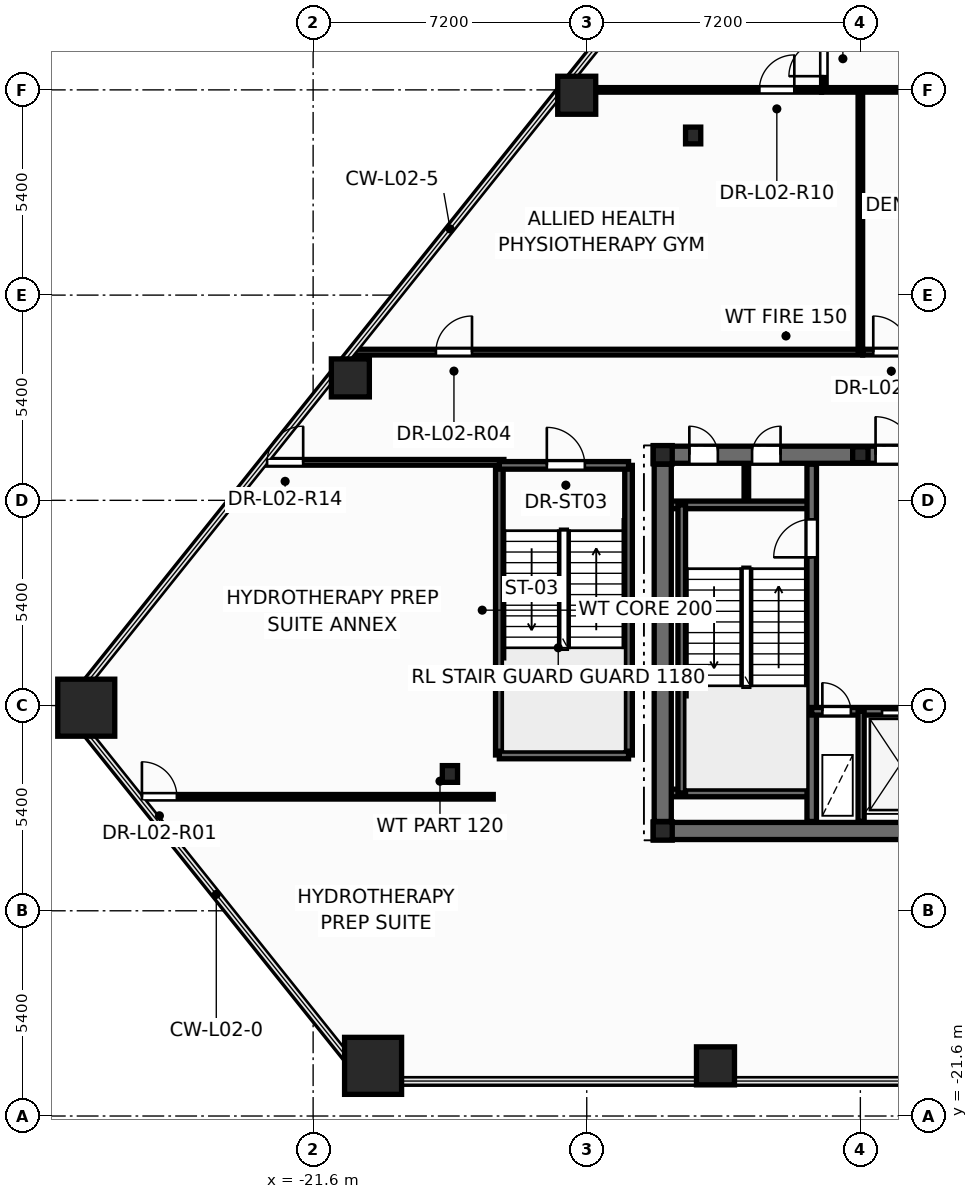
"""IFC4 building model, lengths in metres.
Left out: names, types, materials, properties, quantities, classifications, styles, units other than length and angle.
Written with IfcOpenShell. Run it as: python <this file> out.ifc"""

import sys

from ifc_helpers import new_model, si_unit, direction, frame, frame_2d, origin, origin_2d, place, context, subcontext, project, spatial, rectangle, hollow_rectangle, hollow_circle, i_section, extrude, element, fill, save


model = new_model("IFC4")
c1 = context("Model", 3, precision=1e-05, world=origin(), true_north=direction((0.0, 1.0)))
c2 = subcontext(c1, "Body", "Model", "MODEL_VIEW")
j1 = project(units=[si_unit("LENGTHUNIT", "METRE"), si_unit("PLANEANGLEUNIT", "RADIAN")], contexts=[c1])
p1 = place(None, origin())
s1 = spatial("IfcSite", under=j1, at=p1, CompositionType="ELEMENT")
p2 = place(p1, origin())
s2 = spatial("IfcBuilding", under=s1, at=p2, CompositionType="ELEMENT")
p3 = place(p2, frame((0.0, 0.0, 9.9)))
s3 = spatial("IfcBuildingStorey", under=s2, at=p3, CompositionType="ELEMENT", Elevation=9.9)
for number, where, z_axis, x_axis in (
    (1, (-27.57, -10.856, 0.0), (0.0, 0.0, 1.0), (1.0, 0.0, 0.0)),
    (2, (-20.022, -20.28, 0.0), (0.0, 0.0, 1.0), (1.0, 0.0, 0.0)),
):
    element("IfcColumn", number, at=place(p3, frame(where, z_axis=z_axis, x_axis=x_axis)), inside=s3, PredefinedType="COLUMN", context=c2, shape_type="SweptSolid", body=[
        extrude(hollow_rectangle(XDim=1.5, YDim=1.5, WallThickness=0.075, at=origin_2d()), origin(), (0.0, 0.0, 1.0), 4.5),
    ])
for number, where, z_axis, x_axis in (
    (3, (-11.012, -20.28, 0.0), (0.0, 0.0, 1.0), (1.0, 0.0, 0.0)),
    (4, (-14.664, 5.259, 0.0), (0.0, 0.0, 1.0), (1.0, 0.0, 0.0)),
    (5, (-20.62, -2.179, 0.0), (0.0, 0.0, 1.0), (1.0, 0.0, 0.0)),
):
    element("IfcColumn", number, at=place(p3, frame(where, z_axis=z_axis, x_axis=x_axis)), inside=s3, PredefinedType="COLUMN", context=c2, shape_type="SweptSolid", body=[
        extrude(hollow_circle(Radius=0.5, WallThickness=0.045, at=origin_2d()), origin(), (0.0, 0.0, 1.0), 4.5),
    ])
for number, where, z_axis, x_axis in (
    (6, (-12.4, -14.1, 0.0), (0.0, 0.0, 1.0), (1.0, 0.0, 0.0)),
    (7, (-12.4, -4.2, 0.0), (0.0, 0.0, 1.0), (1.0, 0.0, 0.0)),
):
    element("IfcColumn", number, at=place(p3, frame(where, z_axis=z_axis, x_axis=x_axis)), inside=s3, PredefinedType="COLUMN", context=c2, shape_type="SweptSolid", body=[
        extrude(i_section(OverallWidth=0.5, OverallDepth=0.482, WebThickness=0.04, FlangeThickness=0.045, at=origin_2d()), origin(), (0.0, 0.0, 1.0), 4.5),
    ])
p4 = place(p3, frame((-7.2, -4.2, 0.0), z_axis=(0.0, 0.0, 1.0), x_axis=(1.0, 0.0, 0.0)))
e8 = element("IfcColumn", 8, at=p4, inside=s3, PredefinedType="PILASTER", context=c2, shape_type="SweptSolid", body=[
    extrude(i_section(OverallWidth=0.405, OverallDepth=0.414, WebThickness=0.022, FlangeThickness=0.032, at=origin_2d()), origin(), (0.0, 0.0, 1.0), 4.5),
])
for number, where, z_axis, x_axis in (
    (9, (-18.0, -12.6, 0.0), (0.0, 0.0, 1.0), (1.0, 0.0, 0.0)),
    (10, (-11.6, 4.2, 0.0), (0.0, 0.0, 1.0), (1.0, 0.0, 0.0)),
):
    element("IfcColumn", number, at=place(p3, frame(where, z_axis=z_axis, x_axis=x_axis)), inside=s3, PredefinedType="COLUMN", context=c2, shape_type="SweptSolid", body=[
        extrude(i_section(OverallWidth=0.4, OverallDepth=0.44, WebThickness=0.028, FlangeThickness=0.04, at=origin_2d()), origin(), (0.0, 0.0, 1.0), 4.5),
    ])
p5 = place(p3, frame((-10.2, -5.52, 0.0), z_axis=(0.0, 0.0, 1.0), x_axis=(0.0, 1.0, 0.0)))
e11 = element("IfcWall", 11, at=p5, inside=s3, PredefinedType="PARTITIONING", context=c2, shape_type="SweptSolid", body=[
    extrude(rectangle(XDim=1.12, YDim=0.12, at=frame_2d((0.56, 0.0))), origin(), (0.0, 0.0, 1.0), 4.22),
])
p6 = place(p3, frame((-12.65, -14.1, 0.0), z_axis=(0.0, 0.0, 1.0), x_axis=(1.0, 0.0, 0.0)))
e12 = element("IfcWall", 12, at=p6, inside=s3, PredefinedType="SHEAR", context=c2, shape_type="SweptSolid", body=[
    extrude(rectangle(XDim=25.3, YDim=0.45, at=frame_2d((12.65, 0.0))), origin(), (0.0, 0.0, 1.0), 4.5),
])
p7 = place(p3, frame((-12.65, -4.2, 0.0), z_axis=(0.0, 0.0, 1.0), x_axis=(1.0, 0.0, 0.0)))
e13 = element("IfcWall", 13, at=p7, inside=s3, PredefinedType="SHEAR", context=c2, shape_type="SweptSolid", body=[
    extrude(rectangle(XDim=25.3, YDim=0.45, at=frame_2d((12.65, 0.0))), origin(), (0.0, 0.0, 1.0), 4.5),
])
p8 = place(p7, frame((0.95, 0.0, 0.0)))
e14 = element("IfcOpeningElement", 14, at=p8, cuts=e13, PredefinedType="OPENING", context=c2, shape_type="SweptSolid", body=[
    extrude(rectangle(XDim=0.756, YDim=2.054, at=frame_2d((0.375, 1.027))), frame((0.0, 0.235, 0.0), z_axis=(0.0, -1.0, 0.0), x_axis=(1.0, 0.0, 0.0)), (0.0, 0.0, 1.0), 0.47),
])
p9 = place(p7, frame((2.6, 0.0, 0.0)))
e15 = element("IfcOpeningElement", 15, at=p9, cuts=e13, PredefinedType="OPENING", context=c2, shape_type="SweptSolid", body=[
    extrude(rectangle(XDim=0.756, YDim=2.054, at=frame_2d((0.375, 1.027))), frame((0.0, 0.235, 0.0), z_axis=(0.0, -1.0, 0.0), x_axis=(1.0, 0.0, 0.0)), (0.0, 0.0, 1.0), 0.47),
])
p10 = place(p7, frame((21.85, 0.0, 0.0)))
e16 = element("IfcOpeningElement", 16, at=p10, cuts=e13, PredefinedType="OPENING", context=c2, shape_type="SweptSolid", body=[
    extrude(rectangle(XDim=0.756, YDim=2.054, at=frame_2d((0.375, 1.027))), frame((0.0, 0.235, 0.0), z_axis=(0.0, -1.0, 0.0), x_axis=(1.0, 0.0, 0.0)), (0.0, 0.0, 1.0), 0.47),
])
p11 = place(p7, frame((23.5, 0.0, 0.0)))
e17 = element("IfcOpeningElement", 17, at=p11, cuts=e13, PredefinedType="OPENING", context=c2, shape_type="SweptSolid", body=[
    extrude(rectangle(XDim=0.756, YDim=2.054, at=frame_2d((0.375, 1.027))), frame((0.0, 0.235, 0.0), z_axis=(0.0, -1.0, 0.0), x_axis=(1.0, 0.0, 0.0)), (0.0, 0.0, 1.0), 0.47),
])
p12 = place(p7, frame((5.85, 0.0, 0.0)))
e18 = element("IfcOpeningElement", 18, at=p12, cuts=e13, PredefinedType="OPENING", context=c2, shape_type="SweptSolid", body=[
    extrude(rectangle(XDim=1.006, YDim=2.104, at=frame_2d((0.5, 1.052))), frame((0.0, 0.235, 0.0), z_axis=(0.0, -1.0, 0.0), x_axis=(1.0, 0.0, 0.0)), (0.0, 0.0, 1.0), 0.47),
])
p13 = place(p7, frame((10.35, 0.0, 0.0)))
e19 = element("IfcOpeningElement", 19, at=p13, cuts=e13, PredefinedType="OPENING", context=c2, shape_type="SweptSolid", body=[
    extrude(rectangle(XDim=1.406, YDim=2.154, at=frame_2d((0.7, 1.077))), frame((0.0, 0.235, 0.0), z_axis=(0.0, -1.0, 0.0), x_axis=(1.0, 0.0, 0.0)), (0.0, 0.0, 1.0), 0.47),
])
p14 = place(p7, frame((18.45, 0.0, 0.0)))
e20 = element("IfcOpeningElement", 20, at=p14, cuts=e13, PredefinedType="OPENING", context=c2, shape_type="SweptSolid", body=[
    extrude(rectangle(XDim=1.006, YDim=2.104, at=frame_2d((0.5, 1.052))), frame((0.0, 0.235, 0.0), z_axis=(0.0, -1.0, 0.0), x_axis=(1.0, 0.0, 0.0)), (0.0, 0.0, 1.0), 0.47),
])
for number, where, z_axis, x_axis in (
    (21, (-12.35, -5.52, 0.0), (0.0, 0.0, 1.0), (1.0, 0.0, 0.0)),
    (22, (-12.35, -13.1, 0.0), (0.0, 0.0, 1.0), (1.0, 0.0, 0.0)),
):
    element("IfcWall", number, at=place(p3, frame(where, z_axis=z_axis, x_axis=x_axis)), inside=s3, PredefinedType="SOLIDWALL", context=c2, shape_type="SweptSolid", body=[
        extrude(rectangle(XDim=3.87, YDim=0.2, at=frame_2d((1.935, 0.0))), origin(), (0.0, 0.0, 1.0), 4.5),
    ])
p15 = place(p3, frame((-11.9, -13.1, 0.0), z_axis=(0.0, 0.0, 1.0), x_axis=(0.0, 1.0, 0.0)))
e23 = element("IfcWall", 23, at=p15, inside=s3, PredefinedType="SOLIDWALL", context=c2, shape_type="SweptSolid", body=[
    extrude(rectangle(XDim=7.58, YDim=0.2, at=frame_2d((3.79, 0.0))), origin(), (0.0, 0.0, 1.0), 4.5),
])
p16 = place(p3, frame((-8.48, -13.85, 0.0), z_axis=(0.0, 0.0, 1.0), x_axis=(0.0, 1.0, 0.0)))
e24 = element("IfcWall", 24, at=p16, inside=s3, PredefinedType="SHEAR", context=c2, shape_type="SweptSolid", body=[
    extrude(rectangle(XDim=9.4, YDim=0.25, at=frame_2d((4.7, 0.0))), origin(), (0.0, 0.0, 1.0), 4.5),
])
p17 = place(p16, frame((6.95, 0.0, 0.0)))
e25 = element("IfcOpeningElement", 25, at=p17, cuts=e24, PredefinedType="OPENING", context=c2, shape_type="SweptSolid", body=[
    extrude(rectangle(XDim=1.006, YDim=2.104, at=frame_2d((0.5, 1.052))), frame((0.0, 0.135, 0.0), z_axis=(0.0, -1.0, 0.0), x_axis=(1.0, 0.0, 0.0)), (0.0, 0.0, 1.0), 0.27),
])
p18 = place(p3, frame((-8.48, -10.95, 0.0), z_axis=(0.0, 0.0, 1.0), x_axis=(1.0, 0.0, 0.0)))
e26 = element("IfcWall", 26, at=p18, inside=s3, PredefinedType="SOLIDWALL", context=c2, shape_type="SweptSolid", body=[
    extrude(rectangle(XDim=3.36, YDim=0.2, at=frame_2d((1.68, 0.0))), origin(), (0.0, 0.0, 1.0), 4.5),
])
p19 = place(p18, frame((0.28, 0.0, 0.0)))
e27 = element("IfcOpeningElement", 27, at=p19, cuts=e26, PredefinedType="OPENING", context=c2, shape_type="SweptSolid", body=[
    extrude(rectangle(XDim=0.756, YDim=2.054, at=frame_2d((0.375, 1.027))), frame((0.0, 0.11, 0.0), z_axis=(0.0, -1.0, 0.0), x_axis=(1.0, 0.0, 0.0)), (0.0, 0.0, 1.0), 0.22),
])
p20 = place(p18, frame((1.85, 0.0, 0.0)))
e28 = element("IfcOpeningElement", 28, at=p20, cuts=e26, PredefinedType="OPENING", context=c2, shape_type="SweptSolid", body=[
    extrude(rectangle(XDim=1.106, YDim=2.104, at=frame_2d((0.55, 1.052))), frame((0.0, 0.11, 0.0), z_axis=(0.0, -1.0, 0.0), x_axis=(1.0, 0.0, 0.0)), (0.0, 0.0, 1.0), 0.22),
])
p21 = place(p3, frame((-7.18, -13.85, 0.0), z_axis=(0.0, 0.0, 1.0), x_axis=(0.0, 1.0, 0.0)))
e29 = element("IfcWall", 29, at=p21, inside=s3, PredefinedType="PARTITIONING", context=c2, shape_type="SweptSolid", body=[
    extrude(rectangle(XDim=2.9, YDim=0.16, at=frame_2d((1.45, 0.0))), origin(), (0.0, 0.0, 1.0), 3.245),
])
p22 = place(p3, frame((-12.4, -13.85, 0.0), z_axis=(0.0, 0.0, 1.0), x_axis=(0.0, 1.0, 0.0)))
e30 = element("IfcWall", 30, at=p22, inside=s3, PredefinedType="SHEAR", context=c2, shape_type="SweptSolid", body=[
    extrude(rectangle(XDim=9.4, YDim=0.45, at=frame_2d((4.7, 0.0))), origin(), (0.0, 0.0, 1.0), 4.5),
])
p23 = place(p3, frame((-20.589, -1.5, 0.0), z_axis=(0.0, 0.0, 1.0), x_axis=(1.0, 0.0, 0.0)))
e31 = element("IfcWall", 31, at=p23, inside=s3, PredefinedType="PARTITIONING", context=c2, shape_type="SweptSolid", body=[
    extrude(rectangle(XDim=13.449, YDim=0.15, at=frame_2d((6.725, 0.0))), origin(), (0.0, 0.0, 1.0), 3.287),
])
p24 = place(p23, frame((2.22, 0.0, 0.0)))
e32 = element("IfcOpeningElement", 32, at=p24, cuts=e31, PredefinedType="OPENING", context=c2, shape_type="SweptSolid", body=[
    extrude(rectangle(XDim=0.956, YDim=2.104, at=frame_2d((0.475, 1.052))), frame((0.0, 0.085, 0.0), z_axis=(0.0, -1.0, 0.0), x_axis=(1.0, 0.0, 0.0)), (0.0, 0.0, 1.0), 0.17),
])
p25 = place(p3, frame((-26.205, -13.2, 0.0), z_axis=(0.0, 0.0, 1.0), x_axis=(1.0, 0.0, 0.0)))
e33 = element("IfcWall", 33, at=p25, inside=s3, PredefinedType="PARTITIONING", context=c2, shape_type="SweptSolid", body=[
    extrude(rectangle(XDim=9.345, YDim=0.12, at=frame_2d((4.672, 0.0))), origin(), (0.0, 0.0, 1.0), 3.583),
])
p26 = place(p25, frame((0.1, 0.0, 0.0)))
e34 = element("IfcOpeningElement", 34, at=p26, cuts=e33, PredefinedType="OPENING", context=c2, shape_type="SweptSolid", body=[
    extrude(rectangle(XDim=0.926, YDim=2.104, at=frame_2d((0.46, 1.052))), frame((0.0, 0.07, 0.0), z_axis=(0.0, -1.0, 0.0), x_axis=(1.0, 0.0, 0.0)), (0.0, 0.0, 1.0), 0.14),
])
p27 = place(p3, frame((-8.16, 5.4, 0.0), z_axis=(0.0, 0.0, 1.0), x_axis=(0.0, 1.0, 0.0)))
e35 = element("IfcWall", 35, at=p27, inside=s3, PredefinedType="PARTITIONING", context=c2, shape_type="SweptSolid", body=[
    extrude(rectangle(XDim=8.619, YDim=0.12, at=frame_2d((4.31, 0.0))), origin(), (0.0, 0.0, 1.0), 3.195),
])
p28 = place(p27, frame((0.36, 0.0, 0.0)))
e36 = element("IfcOpeningElement", 36, at=p28, cuts=e35, PredefinedType="OPENING", context=c2, shape_type="SweptSolid", body=[
    extrude(rectangle(XDim=0.926, YDim=2.104, at=frame_2d((0.46, 1.052))), frame((0.0, 0.07, 0.0), z_axis=(0.0, -1.0, 0.0), x_axis=(1.0, 0.0, 0.0)), (0.0, 0.0, 1.0), 0.14),
])
p29 = place(p3, frame((-7.138, -1.5, 0.0), z_axis=(0.0, 0.0, 1.0), x_axis=(1.0, 0.0, 0.0)))
e37 = element("IfcWall", 37, at=p29, inside=s3, PredefinedType="PARTITIONING", context=c2, shape_type="SweptSolid", body=[
    extrude(rectangle(XDim=7.698, YDim=0.15, at=frame_2d((3.849, 0.0))), origin(), (0.0, 0.0, 1.0), 4.22),
])
p30 = place(p29, frame((0.278, 0.0, 0.0)))
e38 = element("IfcOpeningElement", 38, at=p30, cuts=e37, PredefinedType="OPENING", context=c2, shape_type="SweptSolid", body=[
    extrude(rectangle(XDim=0.956, YDim=2.104, at=frame_2d((0.475, 1.052))), frame((0.0, 0.085, 0.0), z_axis=(0.0, -1.0, 0.0), x_axis=(1.0, 0.0, 0.0)), (0.0, 0.0, 1.0), 0.17),
])
for number, where, z_axis, x_axis in (
    (39, (-16.7, -12.1, 0.0), (0.0, 0.0, 1.0), (0.0, 1.0, 0.0)),
    (40, (-13.3, -12.1, 0.0), (0.0, 0.0, 1.0), (0.0, 1.0, 0.0)),
):
    element("IfcWall", number, at=place(p3, frame(where, z_axis=z_axis, x_axis=x_axis)), inside=s3, PredefinedType="SOLIDWALL", context=c2, shape_type="SweptSolid", body=[
        extrude(rectangle(XDim=7.62, YDim=0.2, at=frame_2d((3.81, 0.0))), origin(), (0.0, 0.0, 1.0), 4.5),
    ])
p31 = place(p3, frame((-8.22, 5.4, 0.0), z_axis=(0.0, 0.0, 1.0), x_axis=(1.0, 0.0, 0.0)))
e41 = element("IfcWall", 41, at=p31, inside=s3, PredefinedType="PARTITIONING", context=c2, shape_type="SweptSolid", body=[
    extrude(rectangle(XDim=8.72, YDim=0.12, at=frame_2d((4.36, 0.0))), origin(), (0.0, 0.0, 1.0), 4.22),
])
p32 = place(p3, frame((-15.063, 5.4, 0.0), z_axis=(0.0, 0.0, 1.0), x_axis=(1.0, 0.0, 0.0)))
e42 = element("IfcWall", 42, at=p32, inside=s3, PredefinedType="PARTITIONING", context=c2, shape_type="SweptSolid", body=[
    extrude(rectangle(XDim=6.841, YDim=0.12, at=frame_2d((3.42, 0.0))), origin(), (0.0, 0.0, 1.0), 3.195),
])
p33 = place(p32, frame((5.205, 0.0, 0.0)))
e43 = element("IfcOpeningElement", 43, at=p33, cuts=e42, PredefinedType="OPENING", context=c2, shape_type="SweptSolid", body=[
    extrude(rectangle(XDim=0.926, YDim=2.104, at=frame_2d((0.46, 1.052))), frame((0.0, 0.07, 0.0), z_axis=(0.0, -1.0, 0.0), x_axis=(1.0, 0.0, 0.0)), (0.0, 0.0, 1.0), 0.14),
])
p34 = place(p3, frame((-7.2, -1.5, 0.0), z_axis=(0.0, 0.0, 1.0), x_axis=(0.0, 1.0, 0.0)))
e44 = element("IfcWall", 44, at=p34, inside=s3, PredefinedType="PARTITIONING", context=c2, shape_type="SweptSolid", body=[
    extrude(rectangle(XDim=6.9, YDim=0.12, at=frame_2d((3.45, 0.0))), origin(), (0.0, 0.0, 1.0), 2.995),
])
p35 = place(p3, frame((-22.912, -4.4, 0.0), z_axis=(0.0, 0.0, 1.0), x_axis=(1.0, 0.0, 0.0)))
e45 = element("IfcWall", 45, at=p35, inside=s3, PredefinedType="PARTITIONING", context=c2, shape_type="SweptSolid", body=[
    extrude(rectangle(XDim=6.332, YDim=0.15, at=frame_2d((3.166, 0.0))), origin(), (0.0, 0.0, 1.0), 3.583),
])
p36 = place(p35, frame((0.1, 0.0, 0.0)))
e46 = element("IfcOpeningElement", 46, at=p36, cuts=e45, PredefinedType="OPENING", context=c2, shape_type="SweptSolid", body=[
    extrude(rectangle(XDim=0.956, YDim=2.104, at=frame_2d((0.475, 1.052))), frame((0.0, 0.085, 0.0), z_axis=(0.0, -1.0, 0.0), x_axis=(1.0, 0.0, 0.0)), (0.0, 0.0, 1.0), 0.17),
])
p37 = place(p3, frame((-16.7, -12.1, 0.0), z_axis=(0.0, 0.0, 1.0), x_axis=(1.0, 0.0, 0.0)))
e47 = element("IfcWall", 47, at=p37, inside=s3, PredefinedType="SOLIDWALL", context=c2, shape_type="SweptSolid", body=[
    extrude(rectangle(XDim=3.4, YDim=0.2, at=frame_2d((1.7, 0.0))), origin(), (0.0, 0.0, 1.0), 4.5),
])
p38 = place(p3, frame((-16.7, -4.48, 0.0), z_axis=(0.0, 0.0, 1.0), x_axis=(1.0, 0.0, 0.0)))
e48 = element("IfcWall", 48, at=p38, inside=s3, PredefinedType="SOLIDWALL", context=c2, shape_type="SweptSolid", body=[
    extrude(rectangle(XDim=3.4, YDim=0.2, at=frame_2d((1.7, 0.0))), origin(), (0.0, 0.0, 1.0), 4.5),
])
p39 = place(p38, frame((1.25, 0.0, 0.0)))
e49 = element("IfcOpeningElement", 49, at=p39, cuts=e48, PredefinedType="OPENING", context=c2, shape_type="SweptSolid", body=[
    extrude(rectangle(XDim=1.006, YDim=2.104, at=frame_2d((0.5, 1.052))), frame((0.0, 0.11, 0.0), z_axis=(0.0, -1.0, 0.0), x_axis=(1.0, 0.0, 0.0)), (0.0, 0.0, 1.0), 0.22),
])
p40 = place(p17, origin())
e50 = element("IfcDoor", 50, at=p40, inside=s3, OperationType="SINGLE_SWING_LEFT", PredefinedType="DOOR", context=c2, shape_type="SweptSolid", body=[
    extrude(rectangle(XDim=1.0, YDim=2.1, at=frame_2d((0.5, 1.05))), frame((0.0, 0.025, 0.0), z_axis=(0.0, -1.0, 0.0), x_axis=(1.0, 0.0, 0.0)), (0.0, 0.0, 1.0), 0.05),
])
fill(e25, e50)
p41 = place(p19, origin())
e51 = element("IfcDoor", 51, at=p41, inside=s3, OperationType="SINGLE_SWING_LEFT", PredefinedType="DOOR", context=c2, shape_type="SweptSolid", body=[
    extrude(rectangle(XDim=0.75, YDim=2.05, at=frame_2d((0.375, 1.025))), frame((0.0, 0.025, 0.0), z_axis=(0.0, -1.0, 0.0), x_axis=(1.0, 0.0, 0.0)), (0.0, 0.0, 1.0), 0.05),
])
fill(e27, e51)
p42 = place(p20, origin())
e52 = element("IfcDoor", 52, at=p42, inside=s3, OperationType="DOUBLE_DOOR_SLIDING", PredefinedType="DOOR", context=c2, shape_type="SweptSolid", body=[
    extrude(rectangle(XDim=1.1, YDim=2.1, at=frame_2d((0.55, 1.05))), frame((0.0, 0.025, 0.0), z_axis=(0.0, -1.0, 0.0), x_axis=(1.0, 0.0, 0.0)), (0.0, 0.0, 1.0), 0.05),
])
fill(e28, e52)
p43 = place(p8, origin())
e53 = element("IfcDoor", 53, at=p43, inside=s3, OperationType="SINGLE_SWING_LEFT", PredefinedType="DOOR", context=c2, shape_type="SweptSolid", body=[
    extrude(rectangle(XDim=0.75, YDim=2.05, at=frame_2d((0.375, 1.025))), frame((0.0, 0.025, 0.0), z_axis=(0.0, -1.0, 0.0), x_axis=(1.0, 0.0, 0.0)), (0.0, 0.0, 1.0), 0.05),
])
fill(e14, e53)
p44 = place(p9, origin())
e54 = element("IfcDoor", 54, at=p44, inside=s3, OperationType="SINGLE_SWING_RIGHT", PredefinedType="DOOR", context=c2, shape_type="SweptSolid", body=[
    extrude(rectangle(XDim=0.75, YDim=2.05, at=frame_2d((0.375, 1.025))), frame((0.0, 0.025, 0.0), z_axis=(0.0, -1.0, 0.0), x_axis=(1.0, 0.0, 0.0)), (0.0, 0.0, 1.0), 0.05),
])
fill(e15, e54)
p45 = place(p12, origin())
e55 = element("IfcDoor", 55, at=p45, inside=s3, OperationType="SINGLE_SWING_LEFT", PredefinedType="DOOR", context=c2, shape_type="SweptSolid", body=[
    extrude(rectangle(XDim=1.0, YDim=2.1, at=frame_2d((0.5, 1.05))), frame((0.0, 0.025, 0.0), z_axis=(0.0, -1.0, 0.0), x_axis=(1.0, 0.0, 0.0)), (0.0, 0.0, 1.0), 0.05),
])
fill(e18, e55)
p46 = place(p39, origin())
e56 = element("IfcDoor", 56, at=p46, inside=s3, OperationType="SINGLE_SWING_LEFT", PredefinedType="DOOR", context=c2, shape_type="SweptSolid", body=[
    extrude(rectangle(XDim=1.0, YDim=2.1, at=frame_2d((0.5, 1.05))), frame((0.0, 0.025, 0.0), z_axis=(0.0, -1.0, 0.0), x_axis=(1.0, 0.0, 0.0)), (0.0, 0.0, 1.0), 0.05),
])
fill(e49, e56)
p47 = place(p26, origin())
e57 = element("IfcDoor", 57, at=p47, inside=s3, OperationType="SINGLE_SWING_LEFT", PredefinedType="DOOR", context=c2, shape_type="SweptSolid", body=[
    extrude(rectangle(XDim=0.92, YDim=2.1, at=frame_2d((0.46, 1.05))), frame((0.0, 0.025, 0.0), z_axis=(0.0, -1.0, 0.0), x_axis=(1.0, 0.0, 0.0)), (0.0, 0.0, 1.0), 0.05),
])
fill(e34, e57)
p48 = place(p24, origin())
e58 = element("IfcDoor", 58, at=p48, inside=s3, OperationType="SINGLE_SWING_RIGHT", PredefinedType="DOOR", context=c2, shape_type="SweptSolid", body=[
    extrude(rectangle(XDim=0.95, YDim=2.1, at=frame_2d((0.475, 1.05))), frame((0.0, 0.025, 0.0), z_axis=(0.0, -1.0, 0.0), x_axis=(1.0, 0.0, 0.0)), (0.0, 0.0, 1.0), 0.05),
])
fill(e32, e58)
p49 = place(p30, origin())
e59 = element("IfcDoor", 59, at=p49, inside=s3, OperationType="SINGLE_SWING_LEFT", PredefinedType="DOOR", context=c2, shape_type="SweptSolid", body=[
    extrude(rectangle(XDim=0.95, YDim=2.1, at=frame_2d((0.475, 1.05))), frame((0.0, 0.025, 0.0), z_axis=(0.0, -1.0, 0.0), x_axis=(1.0, 0.0, 0.0)), (0.0, 0.0, 1.0), 0.05),
])
fill(e38, e59)
p50 = place(p33, origin())
e60 = element("IfcDoor", 60, at=p50, inside=s3, OperationType="SINGLE_SWING_RIGHT", PredefinedType="DOOR", context=c2, shape_type="SweptSolid", body=[
    extrude(rectangle(XDim=0.92, YDim=2.1, at=frame_2d((0.46, 1.05))), frame((0.0, 0.025, 0.0), z_axis=(0.0, -1.0, 0.0), x_axis=(1.0, 0.0, 0.0)), (0.0, 0.0, 1.0), 0.05),
])
fill(e43, e60)
p51 = place(p28, origin())
e61 = element("IfcDoor", 61, at=p51, inside=s3, OperationType="SINGLE_SWING_LEFT", PredefinedType="DOOR", context=c2, shape_type="SweptSolid", body=[
    extrude(rectangle(XDim=0.92, YDim=2.1, at=frame_2d((0.46, 1.05))), frame((0.0, 0.025, 0.0), z_axis=(0.0, -1.0, 0.0), x_axis=(1.0, 0.0, 0.0)), (0.0, 0.0, 1.0), 0.05),
])
fill(e36, e61)
p52 = place(p36, origin())
e62 = element("IfcDoor", 62, at=p52, inside=s3, OperationType="SINGLE_SWING_RIGHT", PredefinedType="DOOR", context=c2, shape_type="SweptSolid", body=[
    extrude(rectangle(XDim=0.95, YDim=2.1, at=frame_2d((0.475, 1.05))), frame((0.0, 0.025, 0.0), z_axis=(0.0, -1.0, 0.0), x_axis=(1.0, 0.0, 0.0)), (0.0, 0.0, 1.0), 0.05),
])
fill(e46, e62)
save(model, sys.argv[1])
